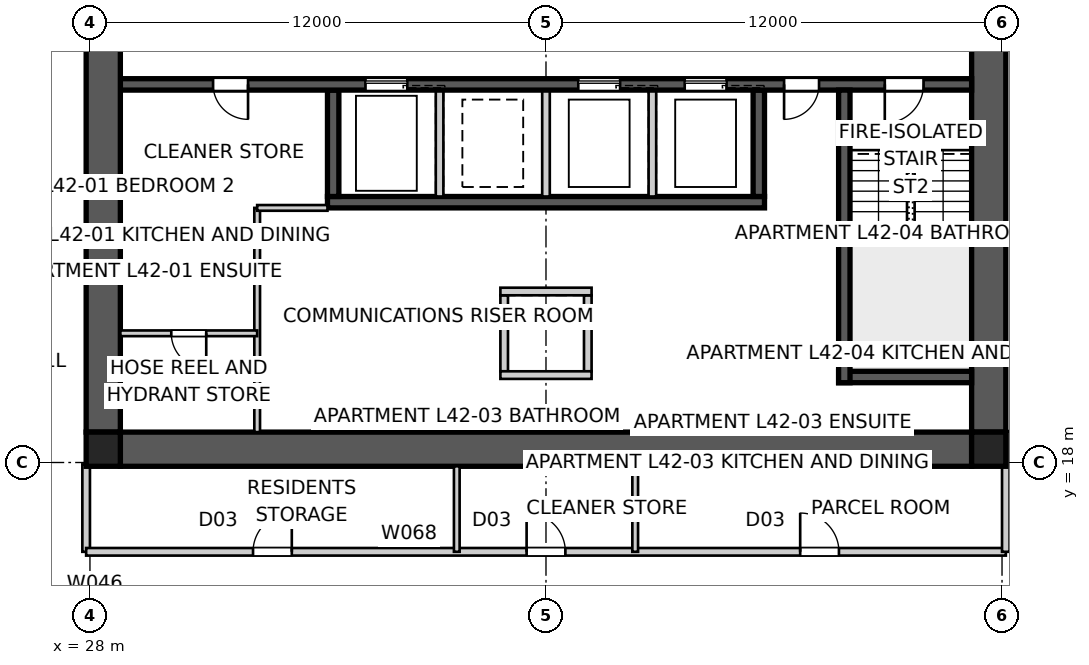
"""IFC4 building model, lengths in metres.
Left out: names, types, materials, properties, quantities, classifications, styles, units other than length and angle.
Written with IfcOpenShell. Run it as: python <this file> out.ifc"""

import sys

from ifc_helpers import new_model, si_unit, direction, frame, frame_2d, origin, origin_2d, place, context, subcontext, project, spatial, polyline, rectangle, outline, extrude, element, fill, save


model = new_model("IFC4")
c1 = context("Model", 3, precision=1e-05, world=origin(), true_north=direction((0.0, 1.0)))
c2 = subcontext(c1, "Body", "Model", "MODEL_VIEW")
j1 = project(units=[si_unit("LENGTHUNIT", "METRE"), si_unit("PLANEANGLEUNIT", "RADIAN")], contexts=[c1])
p1 = place(None, origin())
s1 = spatial("IfcSite", under=j1, at=p1, CompositionType="ELEMENT")
p2 = place(p1, origin())
s2 = spatial("IfcBuilding", under=s1, at=p2, CompositionType="ELEMENT")
p3 = place(p2, frame((0.0, 0.0, 154.0)))
s3 = spatial("IfcBuildingStorey", under=s2, at=p3, CompositionType="ELEMENT", Elevation=154.0)
p4 = place(p3, frame((51.2, 18.35, 0.0), z_axis=(0.0, 0.0, 1.0), x_axis=(-1.0, 0.0, 0.0)))
e1 = element("IfcWall", 1, at=p4, inside=s3, PredefinedType="SHEAR", context=c2, shape_type="SweptSolid", body=[
    extrude(outline(polyline([(0.0, -0.45), (22.4, -0.45), (22.4, -0.025), (22.85, -0.025), (22.85, 0.025), (22.4, 0.025), (22.4, 0.45), (0.0, 0.45), (0.0, 0.025), (-0.45, 0.025), (-0.45, -0.025), (0.0, -0.025), (0.0, -0.45)])), origin(), (0.0, 0.0, 1.0), 3.4),
])
p5 = place(p3, frame((51.65, 18.8, 0.0), z_axis=(0.0, 0.0, 1.0), x_axis=(0.0, 1.0, 0.0)))
e2 = element("IfcWall", 2, at=p5, inside=s3, PredefinedType="SHEAR", context=c2, shape_type="SweptSolid", body=[
    extrude(outline(polyline([(0.0, -0.45), (22.4, -0.45), (22.4, -0.025), (22.85, -0.025), (22.85, 0.025), (22.4, 0.025), (22.4, 0.45), (0.0, 0.45), (0.0, 0.025), (-0.45, 0.025), (-0.45, -0.025), (0.0, -0.025), (0.0, -0.45)])), origin(), (0.0, 0.0, 1.0), 3.4),
])
p6 = place(p5, frame((11.14, 0.0, 0.0)))
e3 = element("IfcOpeningElement", 3, at=p6, cuts=e2, PredefinedType="OPENING", context=c2, shape_type="SweptSolid", body=[
    extrude(rectangle(XDim=1.02, YDim=2.4, at=frame_2d((0.51, 1.2))), frame((0.0, 0.46, 0.0), z_axis=(0.0, -1.0, 0.0), x_axis=(1.0, 0.0, 0.0)), (0.0, 0.0, 1.0), 0.92),
])
p7 = place(p3, frame((28.35, 41.2, 0.0), z_axis=(0.0, 0.0, 1.0), x_axis=(0.0, -1.0, 0.0)))
e4 = element("IfcWall", 4, at=p7, inside=s3, PredefinedType="SHEAR", context=c2, shape_type="SweptSolid", body=[
    extrude(outline(polyline([(0.0, -0.45), (22.4, -0.45), (22.4, -0.025), (22.85, -0.025), (22.85, 0.025), (22.4, 0.025), (22.4, 0.45), (0.0, 0.45), (0.0, 0.025), (-0.45, 0.025), (-0.45, -0.025), (0.0, -0.025), (0.0, -0.45)])), origin(), (0.0, 0.0, 1.0), 3.4),
])
p8 = place(p7, frame((11.14, 0.0, 0.0)))
e5 = element("IfcOpeningElement", 5, at=p8, cuts=e4, PredefinedType="OPENING", context=c2, shape_type="SweptSolid", body=[
    extrude(rectangle(XDim=1.02, YDim=2.4, at=frame_2d((0.51, 1.2))), frame((0.0, 0.46, 0.0), z_axis=(0.0, -1.0, 0.0), x_axis=(1.0, 0.0, 0.0)), (0.0, 0.0, 1.0), 0.92),
])
p9 = place(p3, frame((51.2, 27.95, 0.0), z_axis=(0.0, 0.0, 1.0), x_axis=(-1.0, 0.0, 0.0)))
e6 = element("IfcWall", 6, at=p9, inside=s3, PredefinedType="SHEAR", context=c2, shape_type="SweptSolid", body=[
    extrude(rectangle(XDim=22.4, YDim=0.3, at=frame_2d((11.2, 0.0))), origin(), (0.0, 0.0, 1.0), 3.4),
])
p10 = place(p9, frame((19.04, 0.0, 0.0)))
e7 = element("IfcOpeningElement", 7, at=p10, cuts=e6, PredefinedType="OPENING", context=c2, shape_type="SweptSolid", body=[
    extrude(rectangle(XDim=0.92, YDim=2.1, at=frame_2d((0.46, 1.05))), frame((0.0, 0.16, 0.0), z_axis=(0.0, -1.0, 0.0), x_axis=(1.0, 0.0, 0.0)), (0.0, 0.0, 1.0), 0.32),
])
p11 = place(p9, frame((1.265, 0.0, 0.0)))
e8 = element("IfcOpeningElement", 8, at=p11, cuts=e6, PredefinedType="OPENING", context=c2, shape_type="SweptSolid", body=[
    extrude(rectangle(XDim=1.02, YDim=2.1, at=frame_2d((0.51, 1.05))), frame((0.0, 0.16, 0.0), z_axis=(0.0, -1.0, 0.0), x_axis=(1.0, 0.0, 0.0)), (0.0, 0.0, 1.0), 0.32),
])
p12 = place(p9, frame((4.015, 0.0, 0.0)))
e9 = element("IfcOpeningElement", 9, at=p12, cuts=e6, PredefinedType="OPENING", context=c2, shape_type="SweptSolid", body=[
    extrude(rectangle(XDim=0.92, YDim=2.1, at=frame_2d((0.46, 1.05))), frame((0.0, 0.16, 0.0), z_axis=(0.0, -1.0, 0.0), x_axis=(1.0, 0.0, 0.0)), (0.0, 0.0, 1.0), 0.32),
])
p13 = place(p9, frame((6.45, 0.0, 0.0)))
e10 = element("IfcOpeningElement", 10, at=p13, cuts=e6, PredefinedType="OPENING", context=c2, shape_type="SweptSolid", body=[
    extrude(rectangle(XDim=1.1, YDim=2.1, at=frame_2d((0.55, 1.05))), frame((0.0, 0.16, 0.0), z_axis=(0.0, -1.0, 0.0), x_axis=(1.0, 0.0, 0.0)), (0.0, 0.0, 1.0), 0.32),
])
p14 = place(p9, frame((9.25, 0.0, 0.0)))
e11 = element("IfcOpeningElement", 11, at=p14, cuts=e6, PredefinedType="OPENING", context=c2, shape_type="SweptSolid", body=[
    extrude(rectangle(XDim=1.1, YDim=2.1, at=frame_2d((0.55, 1.05))), frame((0.0, 0.16, 0.0), z_axis=(0.0, -1.0, 0.0), x_axis=(1.0, 0.0, 0.0)), (0.0, 0.0, 1.0), 0.32),
])
p15 = place(p9, frame((14.85, 0.0, 0.0)))
e12 = element("IfcOpeningElement", 12, at=p15, cuts=e6, PredefinedType="OPENING", context=c2, shape_type="SweptSolid", body=[
    extrude(rectangle(XDim=1.1, YDim=2.1, at=frame_2d((0.55, 1.05))), frame((0.0, 0.16, 0.0), z_axis=(0.0, -1.0, 0.0), x_axis=(1.0, 0.0, 0.0)), (0.0, 0.0, 1.0), 0.32),
])
p16 = place(p3, frame((45.75, 24.85, 0.0), z_axis=(0.0, 0.0, 1.0), x_axis=(-1.0, 0.0, 0.0)))
e13 = element("IfcWall", 13, at=p16, inside=s3, PredefinedType="SHEAR", context=c2, shape_type="SweptSolid", body=[
    extrude(rectangle(XDim=11.5, YDim=0.3, at=frame_2d((5.75, 0.0))), origin(), (0.0, 0.0, 1.0), 3.4),
])
p17 = place(p3, frame((45.6, 27.8, 0.0), z_axis=(0.0, 0.0, 1.0), x_axis=(0.0, -1.0, 0.0)))
e14 = element("IfcWall", 14, at=p17, inside=s3, PredefinedType="SHEAR", context=c2, shape_type="SweptSolid", body=[
    extrude(rectangle(XDim=2.8, YDim=0.3, at=frame_2d((1.4, 0.0))), origin(), (0.0, 0.0, 1.0), 3.4),
])
for number, where, z_axis, x_axis in (
    (15, (42.8, 27.8, 0.0), (0.0, 0.0, 1.0), (0.0, -1.0, 0.0)),
    (16, (40.0, 27.8, 0.0), (0.0, 0.0, 1.0), (0.0, -1.0, 0.0)),
    (17, (37.2, 27.8, 0.0), (0.0, 0.0, 1.0), (0.0, -1.0, 0.0)),
):
    element("IfcWall", number, at=place(p3, frame(where, z_axis=z_axis, x_axis=x_axis)), inside=s3, PredefinedType="SOLIDWALL", context=c2, shape_type="SweptSolid", body=[
        extrude(rectangle(XDim=2.8, YDim=0.2, at=frame_2d((1.4, 0.0))), origin(), (0.0, 0.0, 1.0), 3.4),
    ])
p18 = place(p3, frame((34.4, 27.8, 0.0), z_axis=(0.0, 0.0, 1.0), x_axis=(0.0, -1.0, 0.0)))
e18 = element("IfcWall", 18, at=p18, inside=s3, PredefinedType="SHEAR", context=c2, shape_type="SweptSolid", body=[
    extrude(rectangle(XDim=2.8, YDim=0.3, at=frame_2d((1.4, 0.0))), origin(), (0.0, 0.0, 1.0), 3.4),
])
p19 = place(p3, frame((47.85, 27.8, 0.0), z_axis=(0.0, 0.0, 1.0), x_axis=(0.0, -1.0, 0.0)))
e19 = element("IfcWall", 19, at=p19, inside=s3, PredefinedType="SHEAR", context=c2, shape_type="SweptSolid", body=[
    extrude(rectangle(XDim=7.7, YDim=0.3, at=frame_2d((3.85, 0.0))), origin(), (0.0, 0.0, 1.0), 3.4),
])
p20 = place(p3, frame((51.2, 20.25, 0.0), z_axis=(0.0, 0.0, 1.0), x_axis=(-1.0, 0.0, 0.0)))
e20 = element("IfcWall", 20, at=p20, inside=s3, PredefinedType="SHEAR", context=c2, shape_type="SweptSolid", body=[
    extrude(rectangle(XDim=3.5, YDim=0.3, at=frame_2d((1.75, 0.0))), origin(), (0.0, 0.0, 1.0), 3.4),
])
for number, where, z_axis, x_axis in (
    (21, (38.9, 22.4, 0.0), (0.0, 0.0, 1.0), (0.0, -1.0, 0.0)),
    (22, (41.1, 22.4, 0.0), (0.0, 0.0, 1.0), (0.0, -1.0, 0.0)),
):
    element("IfcWall", number, at=place(p3, frame(where, z_axis=z_axis, x_axis=x_axis)), inside=s3, PredefinedType="SOLIDWALL", context=c2, shape_type="SweptSolid", body=[
        extrude(rectangle(XDim=2.0, YDim=0.2, at=frame_2d((1.0, 0.0))), origin(), (0.0, 0.0, 1.0), 3.4),
    ])
for number, where, z_axis, x_axis in (
    (23, (38.8, 22.5, 0.0), (0.0, 0.0, 1.0), (1.0, 0.0, 0.0)),
    (24, (38.8, 20.3, 0.0), (0.0, 0.0, 1.0), (1.0, 0.0, 0.0)),
):
    element("IfcWall", number, at=place(p3, frame(where, z_axis=z_axis, x_axis=x_axis)), inside=s3, PredefinedType="SOLIDWALL", context=c2, shape_type="SweptSolid", body=[
        extrude(rectangle(XDim=2.4, YDim=0.2, at=frame_2d((1.2, 0.0))), origin(), (0.0, 0.0, 1.0), 3.4),
    ])
for number, where, z_axis, x_axis in (
    (25, (28.35, 18.35, 0.0), (0.0, 0.0, 1.0), (1.0, 0.0, 0.0)),
    (26, (51.65, 18.35, 0.0), (0.0, 0.0, 1.0), (1.0, 0.0, 0.0)),
):
    element("IfcColumn", number, at=place(p3, frame(where, z_axis=z_axis, x_axis=x_axis)), inside=s3, PredefinedType="COLUMN", context=c2, shape_type="SweptSolid", body=[
        extrude(rectangle(XDim=0.9, YDim=0.9, at=origin_2d()), origin(), (0.0, 0.0, 1.0), 3.4),
    ])
p21 = place(p3, frame((32.4, 18.8, 0.0), z_axis=(0.0, 0.0, 1.0), x_axis=(0.0, 1.0, 0.0)))
e27 = element("IfcWall", 27, at=p21, inside=s3, PredefinedType="SOLIDWALL", context=c2, shape_type="SweptSolid", body=[
    extrude(rectangle(XDim=5.9, YDim=0.15, at=frame_2d((2.95, 0.0))), origin(), (0.0, 0.0, 1.0), 3.25),
])
p22 = place(p3, frame((32.4, 24.7, 0.0), z_axis=(0.0, 0.0, 1.0), x_axis=(1.0, 0.0, 0.0)))
e28 = element("IfcWall", 28, at=p22, inside=s3, PredefinedType="SOLIDWALL", context=c2, shape_type="SweptSolid", body=[
    extrude(rectangle(XDim=1.85, YDim=0.15, at=frame_2d((0.925, 0.0))), origin(), (0.0, 0.0, 1.0), 3.25),
])
p23 = place(p3, frame((32.4, 21.4, 0.0), z_axis=(0.0, 0.0, 1.0), x_axis=(-1.0, 0.0, 0.0)))
e29 = element("IfcWall", 29, at=p23, inside=s3, PredefinedType="SOLIDWALL", context=c2, shape_type="SweptSolid", body=[
    extrude(rectangle(XDim=3.6, YDim=0.15, at=frame_2d((1.8, 0.0))), origin(), (0.0, 0.0, 1.0), 3.25),
])
p24 = place(p23, frame((1.34, 0.0, 0.0)))
e30 = element("IfcOpeningElement", 30, at=p24, cuts=e29, PredefinedType="OPENING", context=c2, shape_type="SweptSolid", body=[
    extrude(rectangle(XDim=0.92, YDim=2.1, at=frame_2d((0.46, 1.05))), frame((0.0, 0.085, 0.0), z_axis=(0.0, -1.0, 0.0), x_axis=(1.0, 0.0, 0.0)), (0.0, 0.0, 1.0), 0.17),
])
p25 = place(p3, frame((27.9, 17.95, 0.0), z_axis=(0.0, 0.0, 1.0), x_axis=(0.0, -1.0, 0.0)))
e31 = element("IfcWall", 31, at=p25, inside=s3, PredefinedType="PARTITIONING", context=c2, shape_type="SweptSolid", body=[
    extrude(rectangle(XDim=2.3, YDim=0.2, at=frame_2d((1.15, 0.0))), origin(), (0.0, 0.0, 1.0), 3.25),
])
p26 = place(p3, frame((27.9, 15.65, 0.0), z_axis=(0.0, 0.0, 1.0), x_axis=(1.0, 0.0, 0.0)))
e32 = element("IfcWall", 32, at=p26, inside=s3, PredefinedType="PARTITIONING", context=c2, shape_type="SweptSolid", body=[
    extrude(rectangle(XDim=24.2, YDim=0.2, at=frame_2d((12.1, 0.0))), origin(), (0.0, 0.0, 1.0), 3.25),
])
p27 = place(p26, frame((4.391, 0.0, 0.0)))
e33 = element("IfcOpeningElement", 33, at=p27, cuts=e32, PredefinedType="OPENING", context=c2, shape_type="SweptSolid", body=[
    extrude(rectangle(XDim=1.02, YDim=2.1, at=frame_2d((0.51, 1.05))), frame((0.0, 0.11, 0.0), z_axis=(0.0, -1.0, 0.0), x_axis=(1.0, 0.0, 0.0)), (0.0, 0.0, 1.0), 0.22),
])
p28 = place(p26, frame((18.789, 0.0, 0.0)))
e34 = element("IfcOpeningElement", 34, at=p28, cuts=e32, PredefinedType="OPENING", context=c2, shape_type="SweptSolid", body=[
    extrude(rectangle(XDim=1.02, YDim=2.1, at=frame_2d((0.51, 1.05))), frame((0.0, 0.11, 0.0), z_axis=(0.0, -1.0, 0.0), x_axis=(1.0, 0.0, 0.0)), (0.0, 0.0, 1.0), 0.22),
])
p29 = place(p26, frame((11.59, 0.0, 0.0)))
e35 = element("IfcOpeningElement", 35, at=p29, cuts=e32, PredefinedType="OPENING", context=c2, shape_type="SweptSolid", body=[
    extrude(rectangle(XDim=1.02, YDim=2.1, at=frame_2d((0.51, 1.05))), frame((0.0, 0.11, 0.0), z_axis=(0.0, -1.0, 0.0), x_axis=(1.0, 0.0, 0.0)), (0.0, 0.0, 1.0), 0.22),
])
p30 = place(p3, frame((52.1, 15.65, 0.0), z_axis=(0.0, 0.0, 1.0), x_axis=(0.0, 1.0, 0.0)))
e36 = element("IfcWall", 36, at=p30, inside=s3, PredefinedType="PARTITIONING", context=c2, shape_type="SweptSolid", body=[
    extrude(rectangle(XDim=3.17, YDim=0.2, at=frame_2d((1.585, 0.0))), origin(), (0.0, 0.0, 1.0), 3.25),
])
for number, where, z_axis, x_axis in (
    (37, (37.653, 15.65, 0.0), (0.0, 0.0, 1.0), (0.0, 1.0, 0.0)),
    (38, (42.347, 15.65, 0.0), (0.0, 0.0, 1.0), (0.0, 1.0, 0.0)),
):
    element("IfcWall", number, at=place(p3, frame(where, z_axis=z_axis, x_axis=x_axis)), inside=s3, PredefinedType="SOLIDWALL", context=c2, shape_type="SweptSolid", body=[
        extrude(rectangle(XDim=2.25, YDim=0.15, at=frame_2d((1.125, 0.0))), origin(), (0.0, 0.0, 1.0), 3.25),
    ])
p31 = place(p10, origin())
e39 = element("IfcDoor", 39, at=p31, inside=s3, OperationType="SINGLE_SWING_LEFT", PredefinedType="DOOR", context=c2, shape_type="SweptSolid", body=[
    extrude(rectangle(XDim=0.92, YDim=2.1, at=frame_2d((0.46, 1.05))), frame((0.0, 0.025, 0.0), z_axis=(0.0, -1.0, 0.0), x_axis=(1.0, 0.0, 0.0)), (0.0, 0.0, 1.0), 0.05),
])
fill(e7, e39)
p32 = place(p11, origin())
e40 = element("IfcDoor", 40, at=p32, inside=s3, OperationType="SINGLE_SWING_RIGHT", PredefinedType="DOOR", context=c2, shape_type="SweptSolid", body=[
    extrude(rectangle(XDim=1.02, YDim=2.1, at=frame_2d((0.51, 1.05))), frame((0.0, 0.025, 0.0), z_axis=(0.0, -1.0, 0.0), x_axis=(1.0, 0.0, 0.0)), (0.0, 0.0, 1.0), 0.05),
])
fill(e8, e40)
p33 = place(p12, origin())
e41 = element("IfcDoor", 41, at=p33, inside=s3, OperationType="SINGLE_SWING_RIGHT", PredefinedType="DOOR", context=c2, shape_type="SweptSolid", body=[
    extrude(rectangle(XDim=0.92, YDim=2.1, at=frame_2d((0.46, 1.05))), frame((0.0, 0.025, 0.0), z_axis=(0.0, -1.0, 0.0), x_axis=(1.0, 0.0, 0.0)), (0.0, 0.0, 1.0), 0.05),
])
fill(e9, e41)
p34 = place(p27, origin())
e42 = element("IfcDoor", 42, at=p34, inside=s3, OperationType="SINGLE_SWING_RIGHT", PredefinedType="DOOR", context=c2, shape_type="SweptSolid", body=[
    extrude(rectangle(XDim=1.02, YDim=2.1, at=frame_2d((0.51, 1.05))), frame((0.0, 0.025, 0.0), z_axis=(0.0, -1.0, 0.0), x_axis=(1.0, 0.0, 0.0)), (0.0, 0.0, 1.0), 0.05),
])
fill(e33, e42)
p35 = place(p28, origin())
e43 = element("IfcDoor", 43, at=p35, inside=s3, OperationType="SINGLE_SWING_LEFT", PredefinedType="DOOR", context=c2, shape_type="SweptSolid", body=[
    extrude(rectangle(XDim=1.02, YDim=2.1, at=frame_2d((0.51, 1.05))), frame((0.0, 0.025, 0.0), z_axis=(0.0, -1.0, 0.0), x_axis=(1.0, 0.0, 0.0)), (0.0, 0.0, 1.0), 0.05),
])
fill(e34, e43)
p36 = place(p29, origin())
e44 = element("IfcDoor", 44, at=p36, inside=s3, OperationType="SINGLE_SWING_LEFT", PredefinedType="DOOR", context=c2, shape_type="SweptSolid", body=[
    extrude(rectangle(XDim=1.02, YDim=2.1, at=frame_2d((0.51, 1.05))), frame((0.0, 0.025, 0.0), z_axis=(0.0, -1.0, 0.0), x_axis=(1.0, 0.0, 0.0)), (0.0, 0.0, 1.0), 0.05),
])
fill(e35, e44)
p37 = place(p24, origin())
e45 = element("IfcDoor", 45, at=p37, inside=s3, OperationType="SINGLE_SWING_LEFT", PredefinedType="DOOR", context=c2, shape_type="SweptSolid", body=[
    extrude(rectangle(XDim=0.92, YDim=2.1, at=frame_2d((0.46, 1.05))), frame((0.0, 0.025, 0.0), z_axis=(0.0, -1.0, 0.0), x_axis=(1.0, 0.0, 0.0)), (0.0, 0.0, 1.0), 0.05),
])
fill(e30, e45)
p38 = place(p13, origin())
e46 = element("IfcDoor", 46, at=p38, inside=s3, OperationType="SLIDING_TO_LEFT", PredefinedType="DOOR", context=c2, shape_type="SweptSolid", body=[
    extrude(rectangle(XDim=1.1, YDim=2.1, at=frame_2d((0.55, 1.05))), frame((0.0, 0.025, 0.0), z_axis=(0.0, -1.0, 0.0), x_axis=(1.0, 0.0, 0.0)), (0.0, 0.0, 1.0), 0.05),
])
fill(e10, e46)
p39 = place(p14, origin())
e47 = element("IfcDoor", 47, at=p39, inside=s3, OperationType="SLIDING_TO_LEFT", PredefinedType="DOOR", context=c2, shape_type="SweptSolid", body=[
    extrude(rectangle(XDim=1.1, YDim=2.1, at=frame_2d((0.55, 1.05))), frame((0.0, 0.025, 0.0), z_axis=(0.0, -1.0, 0.0), x_axis=(1.0, 0.0, 0.0)), (0.0, 0.0, 1.0), 0.05),
])
fill(e11, e47)
p40 = place(p15, origin())
e48 = element("IfcDoor", 48, at=p40, inside=s3, OperationType="SLIDING_TO_LEFT", PredefinedType="DOOR", context=c2, shape_type="SweptSolid", body=[
    extrude(rectangle(XDim=1.1, YDim=2.1, at=frame_2d((0.55, 1.05))), frame((0.0, 0.025, 0.0), z_axis=(0.0, -1.0, 0.0), x_axis=(1.0, 0.0, 0.0)), (0.0, 0.0, 1.0), 0.05),
])
fill(e12, e48)
save(model, sys.argv[1])
